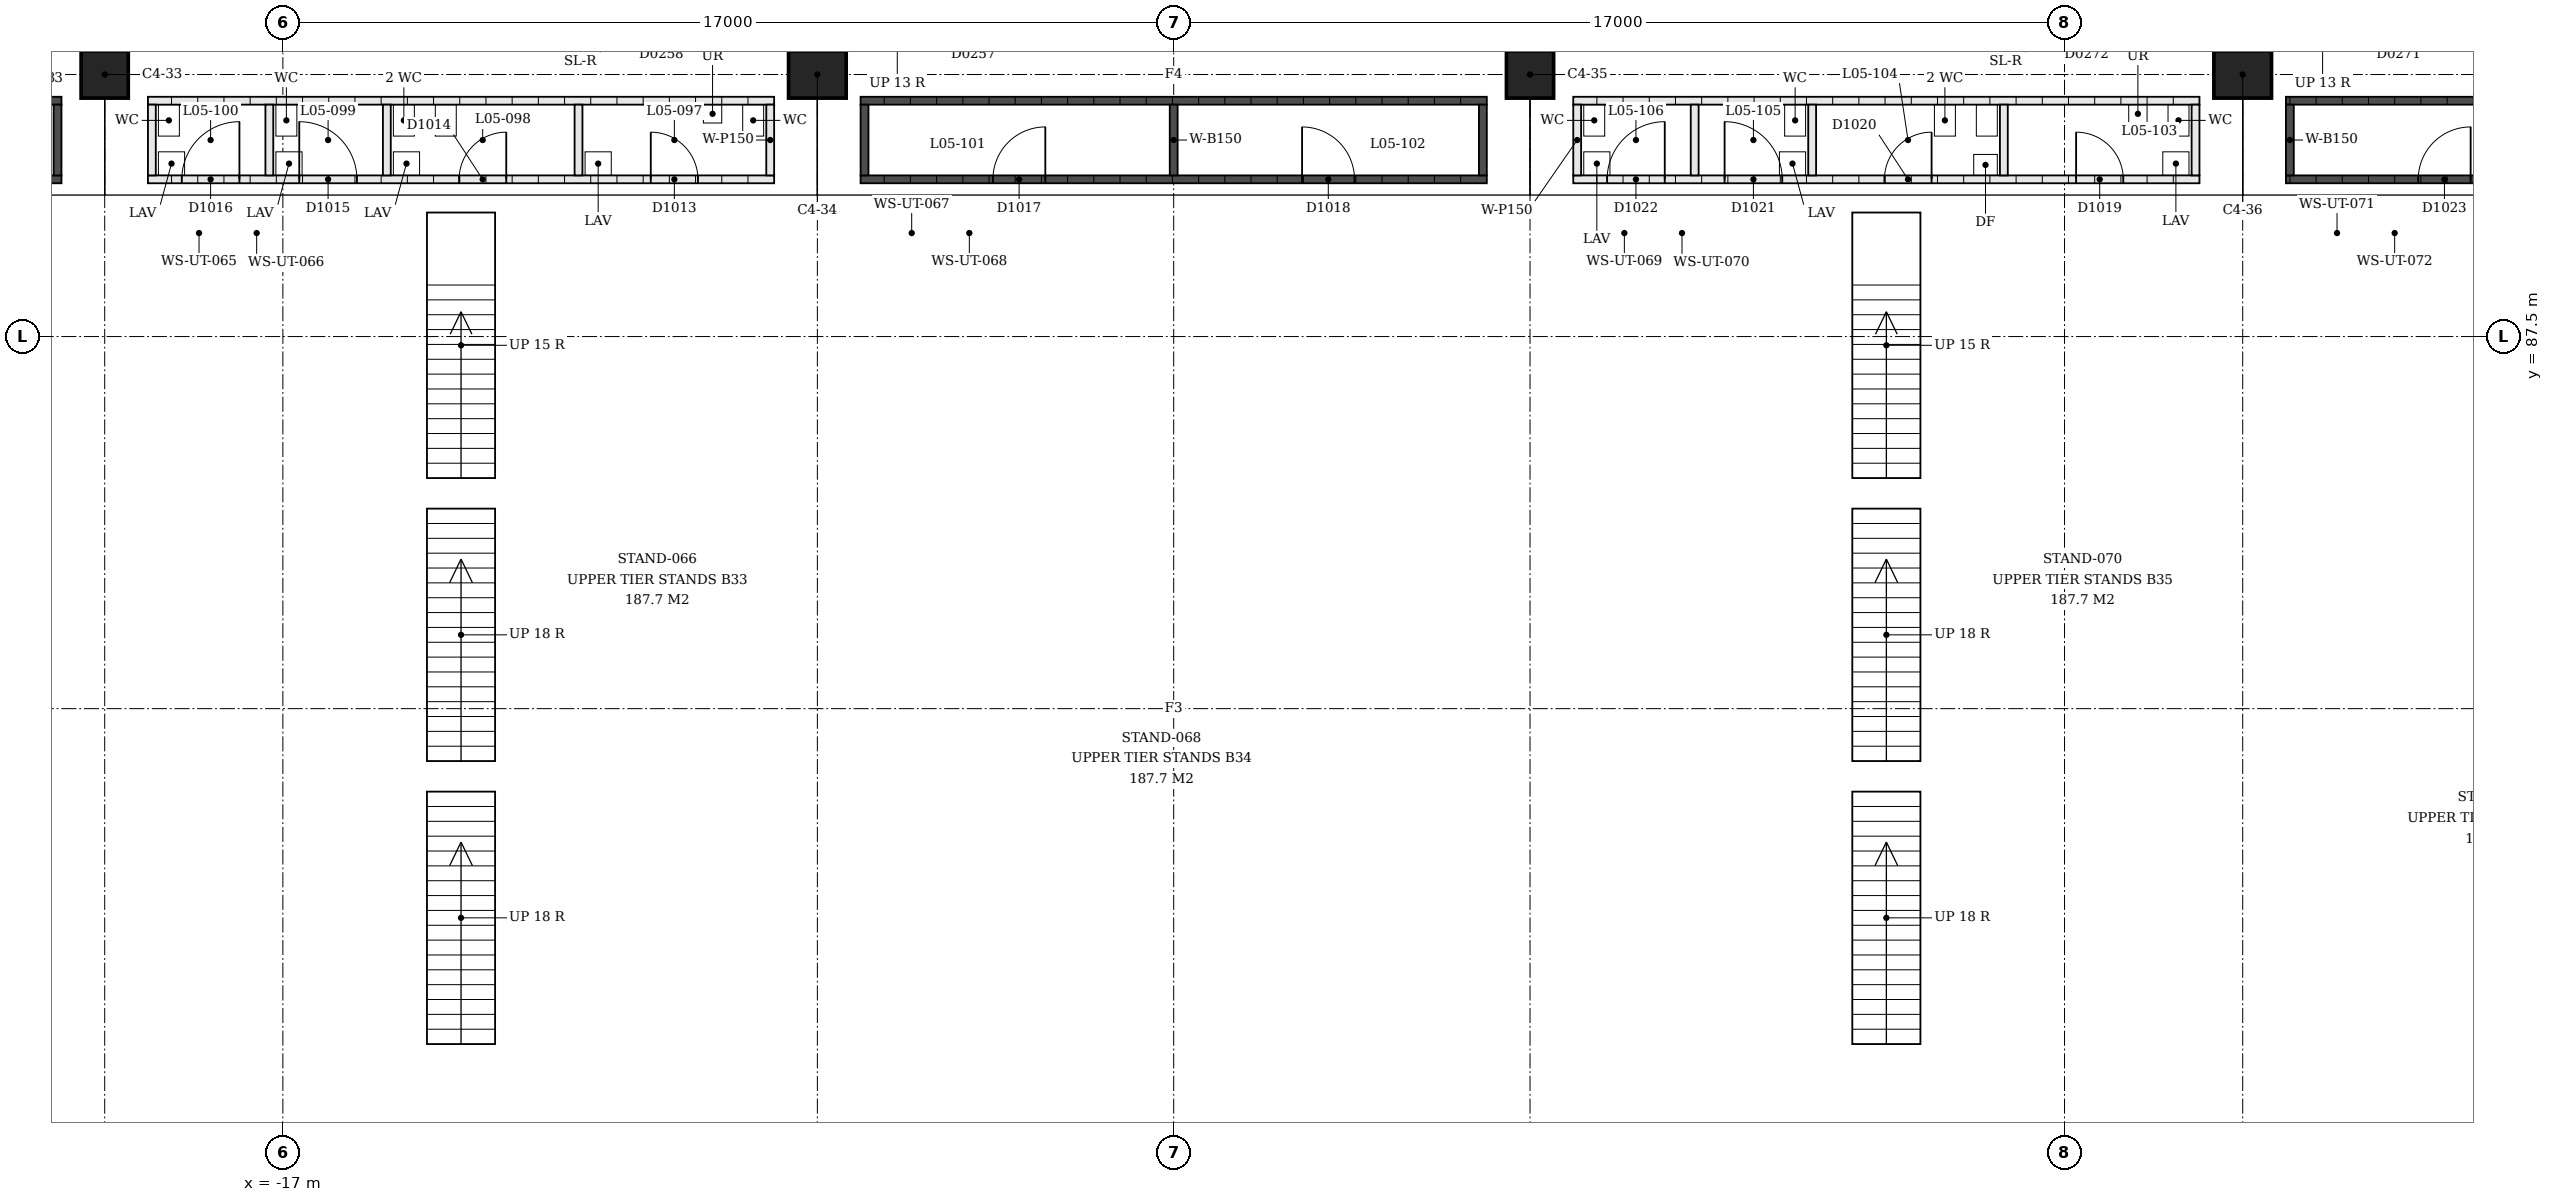
"""IFC4 building model, lengths in metres.
Left out: names, types, materials, properties, quantities, classifications, styles, units other than length and angle.
Written with IfcOpenShell. Run it as: python <this file> out.ifc"""

import sys

from ifc_helpers import new_model, si_unit, direction, frame, frame_2d, origin, origin_2d, place, context, subcontext, project, spatial, rectangle, extrude, element, fill, save


model = new_model("IFC4")
c1 = context("Model", 3, precision=1e-05, world=origin(), true_north=direction((0.0, 1.0)))
c2 = subcontext(c1, "Body", "Model", "MODEL_VIEW")
j1 = project(units=[si_unit("LENGTHUNIT", "METRE"), si_unit("PLANEANGLEUNIT", "RADIAN")], contexts=[c1])
p1 = place(None, origin())
s1 = spatial("IfcSite", under=j1, at=p1, CompositionType="ELEMENT")
p2 = place(p1, origin())
s2 = spatial("IfcBuilding", under=s1, at=p2, CompositionType="ELEMENT")
p3 = place(p2, frame((0.0, 0.0, 22.5)))
s3 = spatial("IfcBuildingStorey", under=s2, at=p3, CompositionType="ELEMENT", Elevation=22.5)
p4 = place(p3, frame((-20.4, 92.5, 0.0), z_axis=(0.0, 0.0, 1.0), x_axis=(-1.0, 0.0, 0.0)))
e1 = element("IfcColumn", 1, at=p4, inside=s3, PredefinedType="COLUMN", context=c2, shape_type="SweptSolid", body=[
    extrude(rectangle(XDim=0.9, YDim=0.9, at=origin_2d()), origin(), (0.0, 0.0, 1.0), 6.5),
])
p5 = place(p3, frame((-6.8, 92.5, 0.0), z_axis=(0.0, 0.0, 1.0), x_axis=(-1.0, 0.0, 0.0)))
e2 = element("IfcColumn", 2, at=p5, inside=s3, PredefinedType="COLUMN", context=c2, shape_type="SweptSolid", body=[
    extrude(rectangle(XDim=1.1, YDim=0.9, at=origin_2d()), origin(), (0.0, 0.0, 1.0), 6.5),
])
p6 = place(p3, frame((6.8, 92.5, 0.0), z_axis=(0.0, 0.0, 1.0), x_axis=(-1.0, 0.0, 0.0)))
e3 = element("IfcColumn", 3, at=p6, inside=s3, PredefinedType="COLUMN", context=c2, shape_type="SweptSolid", body=[
    extrude(rectangle(XDim=0.9, YDim=0.9, at=origin_2d()), origin(), (0.0, 0.0, 1.0), 6.5),
])
p7 = place(p3, frame((20.4, 92.5, 0.0), z_axis=(0.0, 0.0, 1.0), x_axis=(-1.0, 0.0, 0.0)))
e4 = element("IfcColumn", 4, at=p7, inside=s3, PredefinedType="COLUMN", context=c2, shape_type="SweptSolid", body=[
    extrude(rectangle(XDim=1.1, YDim=0.9, at=origin_2d()), origin(), (0.0, 0.0, 1.0), 6.5),
])
p8 = place(p3, frame((-33.175, 90.5, 0.0), z_axis=(0.0, 0.0, 1.0), x_axis=(1.0, 0.0, 0.0)))
e5 = element("IfcWall", 5, at=p8, inside=s3, PredefinedType="SOLIDWALL", context=c2, shape_type="SweptSolid", body=[
    extrude(rectangle(XDim=11.95, YDim=0.15, at=frame_2d((5.975, 0.0))), origin(), (0.0, 0.0, 1.0), 3.0),
])
p9 = place(p8, frame((2.525, 0.0, 0.0)))
e6 = element("IfcOpeningElement", 6, at=p9, cuts=e5, PredefinedType="OPENING", context=c2, shape_type="SweptSolid", body=[
    extrude(rectangle(XDim=1.0, YDim=2.1, at=frame_2d((0.5, 1.05))), frame((0.0, 0.075, 0.0), z_axis=(0.0, -1.0, 0.0), x_axis=(1.0, 0.0, 0.0)), (0.0, 0.0, 1.0), 0.15),
])
p10 = place(p8, frame((8.425, 0.0, 0.0)))
e7 = element("IfcOpeningElement", 7, at=p10, cuts=e5, PredefinedType="OPENING", context=c2, shape_type="SweptSolid", body=[
    extrude(rectangle(XDim=1.0, YDim=2.1, at=frame_2d((0.5, 1.05))), frame((0.0, 0.075, 0.0), z_axis=(0.0, -1.0, 0.0), x_axis=(1.0, 0.0, 0.0)), (0.0, 0.0, 1.0), 0.15),
])
p11 = place(p3, frame((-33.175, 92.0, 0.0), z_axis=(0.0, 0.0, 1.0), x_axis=(1.0, 0.0, 0.0)))
e8 = element("IfcWall", 8, at=p11, inside=s3, PredefinedType="SOLIDWALL", context=c2, shape_type="SweptSolid", body=[
    extrude(rectangle(XDim=11.95, YDim=0.15, at=frame_2d((5.975, 0.0))), origin(), (0.0, 0.0, 1.0), 3.0),
])
p12 = place(p3, frame((-21.3, 90.575, 0.0), z_axis=(0.0, 0.0, 1.0), x_axis=(0.0, 1.0, 0.0)))
e9 = element("IfcWall", 9, at=p12, inside=s3, PredefinedType="SOLIDWALL", context=c2, shape_type="SweptSolid", body=[
    extrude(rectangle(XDim=1.35, YDim=0.15, at=frame_2d((0.675, 0.0))), origin(), (0.0, 0.0, 1.0), 3.0),
])
p13 = place(p3, frame((-7.625, 90.5, 0.0), z_axis=(0.0, 0.0, 1.0), x_axis=(-1.0, 0.0, 0.0)))
e10 = element("IfcWall", 10, at=p13, inside=s3, PredefinedType="PARTITIONING", context=c2, shape_type="SweptSolid", body=[
    extrude(rectangle(XDim=11.95, YDim=0.15, at=frame_2d((5.975, 0.0))), origin(), (0.0, 0.0, 1.0), 3.0),
])
p14 = place(p13, frame((1.454, 0.0, 0.0)))
e11 = element("IfcOpeningElement", 11, at=p14, cuts=e10, PredefinedType="OPENING", context=c2, shape_type="SweptSolid", body=[
    extrude(rectangle(XDim=0.9, YDim=2.1, at=frame_2d((0.45, 1.05))), frame((0.0, 0.075, 0.0), z_axis=(0.0, -1.0, 0.0), x_axis=(1.0, 0.0, 0.0)), (0.0, 0.0, 1.0), 0.15),
])
p15 = place(p13, frame((5.112, 0.0, 0.0)))
e12 = element("IfcOpeningElement", 12, at=p15, cuts=e10, PredefinedType="OPENING", context=c2, shape_type="SweptSolid", body=[
    extrude(rectangle(XDim=0.9, YDim=2.1, at=frame_2d((0.45, 1.05))), frame((0.0, 0.075, 0.0), z_axis=(0.0, -1.0, 0.0), x_axis=(1.0, 0.0, 0.0)), (0.0, 0.0, 1.0), 0.15),
])
p16 = place(p13, frame((7.962, 0.0, 0.0)))
e13 = element("IfcOpeningElement", 13, at=p16, cuts=e10, PredefinedType="OPENING", context=c2, shape_type="SweptSolid", body=[
    extrude(rectangle(XDim=1.1, YDim=2.1, at=frame_2d((0.55, 1.05))), frame((0.0, 0.075, 0.0), z_axis=(0.0, -1.0, 0.0), x_axis=(1.0, 0.0, 0.0)), (0.0, 0.0, 1.0), 0.15),
])
p17 = place(p13, frame((10.204, 0.0, 0.0)))
e14 = element("IfcOpeningElement", 14, at=p17, cuts=e10, PredefinedType="OPENING", context=c2, shape_type="SweptSolid", body=[
    extrude(rectangle(XDim=1.1, YDim=2.1, at=frame_2d((0.55, 1.05))), frame((0.0, 0.075, 0.0), z_axis=(0.0, -1.0, 0.0), x_axis=(1.0, 0.0, 0.0)), (0.0, 0.0, 1.0), 0.15),
])
p18 = place(p3, frame((-7.625, 92.0, 0.0), z_axis=(0.0, 0.0, 1.0), x_axis=(-1.0, 0.0, 0.0)))
e15 = element("IfcWall", 15, at=p18, inside=s3, PredefinedType="PARTITIONING", context=c2, shape_type="SweptSolid", body=[
    extrude(rectangle(XDim=11.95, YDim=0.15, at=frame_2d((5.975, 0.0))), origin(), (0.0, 0.0, 1.0), 3.0),
])
for number, where, z_axis, x_axis in (
    (16, (-7.7, 90.575, 0.0), (0.0, 0.0, 1.0), (0.0, 1.0, 0.0)),
    (17, (-11.358, 90.575, 0.0), (0.0, 0.0, 1.0), (0.0, 1.0, 0.0)),
    (18, (-15.016, 90.575, 0.0), (0.0, 0.0, 1.0), (0.0, 1.0, 0.0)),
    (19, (-17.258, 90.575, 0.0), (0.0, 0.0, 1.0), (0.0, 1.0, 0.0)),
    (20, (-19.5, 90.575, 0.0), (0.0, 0.0, 1.0), (0.0, 1.0, 0.0)),
):
    element("IfcWall", number, at=place(p3, frame(where, z_axis=z_axis, x_axis=x_axis)), inside=s3, PredefinedType="PARTITIONING", context=c2, shape_type="SweptSolid", body=[
        extrude(rectangle(XDim=1.35, YDim=0.15, at=frame_2d((0.675, 0.0))), origin(), (0.0, 0.0, 1.0), 3.0),
    ])
p19 = place(p3, frame((-5.975, 90.5, 0.0), z_axis=(0.0, 0.0, 1.0), x_axis=(1.0, 0.0, 0.0)))
e21 = element("IfcWall", 21, at=p19, inside=s3, PredefinedType="SOLIDWALL", context=c2, shape_type="SweptSolid", body=[
    extrude(rectangle(XDim=11.95, YDim=0.15, at=frame_2d((5.975, 0.0))), origin(), (0.0, 0.0, 1.0), 3.0),
])
p20 = place(p19, frame((2.525, 0.0, 0.0)))
e22 = element("IfcOpeningElement", 22, at=p20, cuts=e21, PredefinedType="OPENING", context=c2, shape_type="SweptSolid", body=[
    extrude(rectangle(XDim=1.0, YDim=2.1, at=frame_2d((0.5, 1.05))), frame((0.0, 0.075, 0.0), z_axis=(0.0, -1.0, 0.0), x_axis=(1.0, 0.0, 0.0)), (0.0, 0.0, 1.0), 0.15),
])
p21 = place(p19, frame((8.425, 0.0, 0.0)))
e23 = element("IfcOpeningElement", 23, at=p21, cuts=e21, PredefinedType="OPENING", context=c2, shape_type="SweptSolid", body=[
    extrude(rectangle(XDim=1.0, YDim=2.1, at=frame_2d((0.5, 1.05))), frame((0.0, 0.075, 0.0), z_axis=(0.0, -1.0, 0.0), x_axis=(1.0, 0.0, 0.0)), (0.0, 0.0, 1.0), 0.15),
])
p22 = place(p3, frame((-5.975, 92.0, 0.0), z_axis=(0.0, 0.0, 1.0), x_axis=(1.0, 0.0, 0.0)))
e24 = element("IfcWall", 24, at=p22, inside=s3, PredefinedType="SOLIDWALL", context=c2, shape_type="SweptSolid", body=[
    extrude(rectangle(XDim=11.95, YDim=0.15, at=frame_2d((5.975, 0.0))), origin(), (0.0, 0.0, 1.0), 3.0),
])
for number, where, z_axis, x_axis in (
    (25, (-5.9, 90.575, 0.0), (0.0, 0.0, 1.0), (0.0, 1.0, 0.0)),
    (26, (0.0, 90.575, 0.0), (0.0, 0.0, 1.0), (0.0, 1.0, 0.0)),
    (27, (5.9, 90.575, 0.0), (0.0, 0.0, 1.0), (0.0, 1.0, 0.0)),
):
    element("IfcWall", number, at=place(p3, frame(where, z_axis=z_axis, x_axis=x_axis)), inside=s3, PredefinedType="SOLIDWALL", context=c2, shape_type="SweptSolid", body=[
        extrude(rectangle(XDim=1.35, YDim=0.15, at=frame_2d((0.675, 0.0))), origin(), (0.0, 0.0, 1.0), 3.0),
    ])
p23 = place(p3, frame((19.575, 90.5, 0.0), z_axis=(0.0, 0.0, 1.0), x_axis=(-1.0, 0.0, 0.0)))
e28 = element("IfcWall", 28, at=p23, inside=s3, PredefinedType="PARTITIONING", context=c2, shape_type="SweptSolid", body=[
    extrude(rectangle(XDim=11.95, YDim=0.15, at=frame_2d((5.975, 0.0))), origin(), (0.0, 0.0, 1.0), 3.0),
])
p24 = place(p23, frame((1.454, 0.0, 0.0)))
e29 = element("IfcOpeningElement", 29, at=p24, cuts=e28, PredefinedType="OPENING", context=c2, shape_type="SweptSolid", body=[
    extrude(rectangle(XDim=0.9, YDim=2.1, at=frame_2d((0.45, 1.05))), frame((0.0, 0.075, 0.0), z_axis=(0.0, -1.0, 0.0), x_axis=(1.0, 0.0, 0.0)), (0.0, 0.0, 1.0), 0.15),
])
p25 = place(p23, frame((5.112, 0.0, 0.0)))
e30 = element("IfcOpeningElement", 30, at=p25, cuts=e28, PredefinedType="OPENING", context=c2, shape_type="SweptSolid", body=[
    extrude(rectangle(XDim=0.9, YDim=2.1, at=frame_2d((0.45, 1.05))), frame((0.0, 0.075, 0.0), z_axis=(0.0, -1.0, 0.0), x_axis=(1.0, 0.0, 0.0)), (0.0, 0.0, 1.0), 0.15),
])
p26 = place(p23, frame((7.962, 0.0, 0.0)))
e31 = element("IfcOpeningElement", 31, at=p26, cuts=e28, PredefinedType="OPENING", context=c2, shape_type="SweptSolid", body=[
    extrude(rectangle(XDim=1.1, YDim=2.1, at=frame_2d((0.55, 1.05))), frame((0.0, 0.075, 0.0), z_axis=(0.0, -1.0, 0.0), x_axis=(1.0, 0.0, 0.0)), (0.0, 0.0, 1.0), 0.15),
])
p27 = place(p23, frame((10.204, 0.0, 0.0)))
e32 = element("IfcOpeningElement", 32, at=p27, cuts=e28, PredefinedType="OPENING", context=c2, shape_type="SweptSolid", body=[
    extrude(rectangle(XDim=1.1, YDim=2.1, at=frame_2d((0.55, 1.05))), frame((0.0, 0.075, 0.0), z_axis=(0.0, -1.0, 0.0), x_axis=(1.0, 0.0, 0.0)), (0.0, 0.0, 1.0), 0.15),
])
p28 = place(p3, frame((19.575, 92.0, 0.0), z_axis=(0.0, 0.0, 1.0), x_axis=(-1.0, 0.0, 0.0)))
e33 = element("IfcWall", 33, at=p28, inside=s3, PredefinedType="PARTITIONING", context=c2, shape_type="SweptSolid", body=[
    extrude(rectangle(XDim=11.95, YDim=0.15, at=frame_2d((5.975, 0.0))), origin(), (0.0, 0.0, 1.0), 3.0),
])
for number, where, z_axis, x_axis in (
    (34, (19.5, 90.575, 0.0), (0.0, 0.0, 1.0), (0.0, 1.0, 0.0)),
    (35, (15.842, 90.575, 0.0), (0.0, 0.0, 1.0), (0.0, 1.0, 0.0)),
    (36, (12.184, 90.575, 0.0), (0.0, 0.0, 1.0), (0.0, 1.0, 0.0)),
    (37, (9.942, 90.575, 0.0), (0.0, 0.0, 1.0), (0.0, 1.0, 0.0)),
    (38, (7.7, 90.575, 0.0), (0.0, 0.0, 1.0), (0.0, 1.0, 0.0)),
):
    element("IfcWall", number, at=place(p3, frame(where, z_axis=z_axis, x_axis=x_axis)), inside=s3, PredefinedType="PARTITIONING", context=c2, shape_type="SweptSolid", body=[
        extrude(rectangle(XDim=1.35, YDim=0.15, at=frame_2d((0.675, 0.0))), origin(), (0.0, 0.0, 1.0), 3.0),
    ])
p29 = place(p3, frame((21.225, 90.5, 0.0), z_axis=(0.0, 0.0, 1.0), x_axis=(1.0, 0.0, 0.0)))
e39 = element("IfcWall", 39, at=p29, inside=s3, PredefinedType="SOLIDWALL", context=c2, shape_type="SweptSolid", body=[
    extrude(rectangle(XDim=11.95, YDim=0.15, at=frame_2d((5.975, 0.0))), origin(), (0.0, 0.0, 1.0), 3.0),
])
p30 = place(p29, frame((2.525, 0.0, 0.0)))
e40 = element("IfcOpeningElement", 40, at=p30, cuts=e39, PredefinedType="OPENING", context=c2, shape_type="SweptSolid", body=[
    extrude(rectangle(XDim=1.0, YDim=2.1, at=frame_2d((0.5, 1.05))), frame((0.0, 0.075, 0.0), z_axis=(0.0, -1.0, 0.0), x_axis=(1.0, 0.0, 0.0)), (0.0, 0.0, 1.0), 0.15),
])
p31 = place(p29, frame((8.425, 0.0, 0.0)))
e41 = element("IfcOpeningElement", 41, at=p31, cuts=e39, PredefinedType="OPENING", context=c2, shape_type="SweptSolid", body=[
    extrude(rectangle(XDim=1.0, YDim=2.1, at=frame_2d((0.5, 1.05))), frame((0.0, 0.075, 0.0), z_axis=(0.0, -1.0, 0.0), x_axis=(1.0, 0.0, 0.0)), (0.0, 0.0, 1.0), 0.15),
])
p32 = place(p3, frame((21.225, 92.0, 0.0), z_axis=(0.0, 0.0, 1.0), x_axis=(1.0, 0.0, 0.0)))
e42 = element("IfcWall", 42, at=p32, inside=s3, PredefinedType="SOLIDWALL", context=c2, shape_type="SweptSolid", body=[
    extrude(rectangle(XDim=11.95, YDim=0.15, at=frame_2d((5.975, 0.0))), origin(), (0.0, 0.0, 1.0), 3.0),
])
p33 = place(p3, frame((21.3, 90.575, 0.0), z_axis=(0.0, 0.0, 1.0), x_axis=(0.0, 1.0, 0.0)))
e43 = element("IfcWall", 43, at=p33, inside=s3, PredefinedType="SOLIDWALL", context=c2, shape_type="SweptSolid", body=[
    extrude(rectangle(XDim=1.35, YDim=0.15, at=frame_2d((0.675, 0.0))), origin(), (0.0, 0.0, 1.0), 3.0),
])
p34 = place(p14, origin())
e44 = element("IfcDoor", 44, at=p34, inside=s3, OperationType="SINGLE_SWING_RIGHT", PredefinedType="DOOR", context=c2, shape_type="SweptSolid", body=[
    extrude(rectangle(XDim=0.9, YDim=2.1, at=frame_2d((0.45, 1.05))), frame((0.0, 0.025, 0.0), z_axis=(0.0, -1.0, 0.0), x_axis=(1.0, 0.0, 0.0)), (0.0, 0.0, 1.0), 0.05),
])
fill(e11, e44)
p35 = place(p15, origin())
e45 = element("IfcDoor", 45, at=p35, inside=s3, OperationType="SINGLE_SWING_LEFT", PredefinedType="DOOR", context=c2, shape_type="SweptSolid", body=[
    extrude(rectangle(XDim=0.9, YDim=2.1, at=frame_2d((0.45, 1.05))), frame((0.0, 0.025, 0.0), z_axis=(0.0, -1.0, 0.0), x_axis=(1.0, 0.0, 0.0)), (0.0, 0.0, 1.0), 0.05),
])
fill(e12, e45)
p36 = place(p16, origin())
e46 = element("IfcDoor", 46, at=p36, inside=s3, OperationType="SINGLE_SWING_RIGHT", PredefinedType="DOOR", context=c2, shape_type="SweptSolid", body=[
    extrude(rectangle(XDim=1.1, YDim=2.1, at=frame_2d((0.55, 1.05))), frame((0.0, 0.025, 0.0), z_axis=(0.0, -1.0, 0.0), x_axis=(1.0, 0.0, 0.0)), (0.0, 0.0, 1.0), 0.05),
])
fill(e13, e46)
p37 = place(p17, origin())
e47 = element("IfcDoor", 47, at=p37, inside=s3, OperationType="SINGLE_SWING_LEFT", PredefinedType="DOOR", context=c2, shape_type="SweptSolid", body=[
    extrude(rectangle(XDim=1.1, YDim=2.1, at=frame_2d((0.55, 1.05))), frame((0.0, 0.025, 0.0), z_axis=(0.0, -1.0, 0.0), x_axis=(1.0, 0.0, 0.0)), (0.0, 0.0, 1.0), 0.05),
])
fill(e14, e47)
p38 = place(p20, origin())
e48 = element("IfcDoor", 48, at=p38, inside=s3, OperationType="SINGLE_SWING_LEFT", PredefinedType="DOOR", context=c2, shape_type="SweptSolid", body=[
    extrude(rectangle(XDim=1.0, YDim=2.1, at=frame_2d((0.5, 1.05))), frame((0.0, 0.025, 0.0), z_axis=(0.0, -1.0, 0.0), x_axis=(1.0, 0.0, 0.0)), (0.0, 0.0, 1.0), 0.05),
])
fill(e22, e48)
p39 = place(p21, origin())
e49 = element("IfcDoor", 49, at=p39, inside=s3, OperationType="SINGLE_SWING_RIGHT", PredefinedType="DOOR", context=c2, shape_type="SweptSolid", body=[
    extrude(rectangle(XDim=1.0, YDim=2.1, at=frame_2d((0.5, 1.05))), frame((0.0, 0.025, 0.0), z_axis=(0.0, -1.0, 0.0), x_axis=(1.0, 0.0, 0.0)), (0.0, 0.0, 1.0), 0.05),
])
fill(e23, e49)
p40 = place(p24, origin())
e50 = element("IfcDoor", 50, at=p40, inside=s3, OperationType="SINGLE_SWING_RIGHT", PredefinedType="DOOR", context=c2, shape_type="SweptSolid", body=[
    extrude(rectangle(XDim=0.9, YDim=2.1, at=frame_2d((0.45, 1.05))), frame((0.0, 0.025, 0.0), z_axis=(0.0, -1.0, 0.0), x_axis=(1.0, 0.0, 0.0)), (0.0, 0.0, 1.0), 0.05),
])
fill(e29, e50)
p41 = place(p25, origin())
e51 = element("IfcDoor", 51, at=p41, inside=s3, OperationType="SINGLE_SWING_LEFT", PredefinedType="DOOR", context=c2, shape_type="SweptSolid", body=[
    extrude(rectangle(XDim=0.9, YDim=2.1, at=frame_2d((0.45, 1.05))), frame((0.0, 0.025, 0.0), z_axis=(0.0, -1.0, 0.0), x_axis=(1.0, 0.0, 0.0)), (0.0, 0.0, 1.0), 0.05),
])
fill(e30, e51)
p42 = place(p26, origin())
e52 = element("IfcDoor", 52, at=p42, inside=s3, OperationType="SINGLE_SWING_RIGHT", PredefinedType="DOOR", context=c2, shape_type="SweptSolid", body=[
    extrude(rectangle(XDim=1.1, YDim=2.1, at=frame_2d((0.55, 1.05))), frame((0.0, 0.025, 0.0), z_axis=(0.0, -1.0, 0.0), x_axis=(1.0, 0.0, 0.0)), (0.0, 0.0, 1.0), 0.05),
])
fill(e31, e52)
p43 = place(p27, origin())
e53 = element("IfcDoor", 53, at=p43, inside=s3, OperationType="SINGLE_SWING_LEFT", PredefinedType="DOOR", context=c2, shape_type="SweptSolid", body=[
    extrude(rectangle(XDim=1.1, YDim=2.1, at=frame_2d((0.55, 1.05))), frame((0.0, 0.025, 0.0), z_axis=(0.0, -1.0, 0.0), x_axis=(1.0, 0.0, 0.0)), (0.0, 0.0, 1.0), 0.05),
])
fill(e32, e53)
p44 = place(p30, origin())
e54 = element("IfcDoor", 54, at=p44, inside=s3, OperationType="SINGLE_SWING_LEFT", PredefinedType="DOOR", context=c2, shape_type="SweptSolid", body=[
    extrude(rectangle(XDim=1.0, YDim=2.1, at=frame_2d((0.5, 1.05))), frame((0.0, 0.025, 0.0), z_axis=(0.0, -1.0, 0.0), x_axis=(1.0, 0.0, 0.0)), (0.0, 0.0, 1.0), 0.05),
])
fill(e40, e54)
save(model, sys.argv[1])
